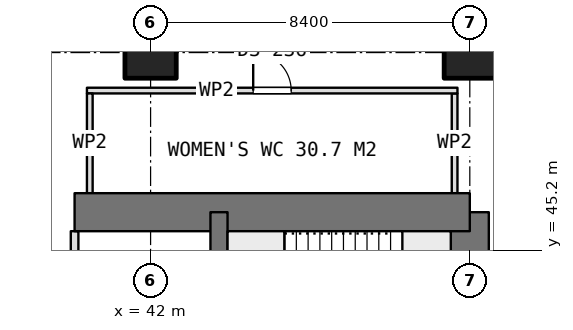
"""IFC4 building model, lengths in metres.
Left out: names, types, materials, properties, quantities, classifications, styles, units other than length and angle.
Written with IfcOpenShell. Run it as: python <this file> out.ifc"""

import sys

from ifc_helpers import new_model, si_unit, direction, frame, frame_2d, origin, origin_2d, place, context, subcontext, project, spatial, rectangle, extrude, element, fill, save


model = new_model("IFC4")
c1 = context("Model", 3, precision=1e-05, world=origin(), true_north=direction((0.0, 1.0)))
c2 = subcontext(c1, "Body", "Model", "MODEL_VIEW")
j1 = project(units=[si_unit("LENGTHUNIT", "METRE"), si_unit("PLANEANGLEUNIT", "RADIAN")], contexts=[c1])
p1 = place(None, origin())
s1 = spatial("IfcSite", under=j1, at=p1, CompositionType="ELEMENT")
p2 = place(p1, origin())
s2 = spatial("IfcBuilding", under=s1, at=p2, CompositionType="ELEMENT")
p3 = place(p2, frame((0.0, 0.0, 217.7)))
s3 = spatial("IfcBuildingStorey", under=s2, at=p3, CompositionType="ELEMENT", Elevation=217.7)
p4 = place(p3, frame((40.0, 46.2, 0.0), z_axis=(0.0, 0.0, 1.0), x_axis=(1.0, 0.0, 0.0)))
e1 = element("IfcWall", 1, at=p4, inside=s3, PredefinedType="SHEAR", context=c2, shape_type="SweptSolid", body=[
    extrude(rectangle(XDim=10.4, YDim=1.0, at=frame_2d((5.2, 0.0))), origin(), (0.0, 0.0, 1.0), 3.75),
])
p5 = place(p3, frame((50.4, 21.0, 0.0), z_axis=(0.0, 0.0, 1.0), x_axis=(0.0, 1.0, 0.0)))
e2 = element("IfcWall", 2, at=p5, inside=s3, PredefinedType="SHEAR", context=c2, shape_type="SweptSolid", body=[
    extrude(rectangle(XDim=25.2, YDim=1.0, at=frame_2d((12.6, 0.0))), origin(), (0.0, 0.0, 1.0), 3.75),
])
p6 = place(p5, frame((16.2, 0.0, 0.0)))
e3 = element("IfcOpeningElement", 3, at=p6, cuts=e2, PredefinedType="OPENING", context=c2, shape_type="SweptSolid", body=[
    extrude(rectangle(XDim=1.2, YDim=2.1, at=frame_2d((0.6, 1.05))), frame((0.0, 0.51, 0.0), z_axis=(0.0, -1.0, 0.0), x_axis=(1.0, 0.0, 0.0)), (0.0, 0.0, 1.0), 1.02),
])
p7 = place(p5, frame((10.05, 0.0, 0.0)))
e4 = element("IfcOpeningElement", 4, at=p7, cuts=e2, PredefinedType="OPENING", context=c2, shape_type="SweptSolid", body=[
    extrude(rectangle(XDim=0.9, YDim=2.1, at=frame_2d((0.45, 1.05))), frame((0.0, 0.51, 0.0), z_axis=(0.0, -1.0, 0.0), x_axis=(1.0, 0.0, 0.0)), (0.0, 0.0, 1.0), 1.02),
])
p8 = place(p5, frame((7.45, 0.0, 0.0)))
e5 = element("IfcOpeningElement", 5, at=p8, cuts=e2, PredefinedType="OPENING", context=c2, shape_type="SweptSolid", body=[
    extrude(rectangle(XDim=0.9, YDim=2.1, at=frame_2d((0.45, 1.05))), frame((0.0, 0.51, 0.0), z_axis=(0.0, -1.0, 0.0), x_axis=(1.0, 0.0, 0.0)), (0.0, 0.0, 1.0), 1.02),
])
p9 = place(p5, frame((0.7, 0.0, 0.0)))
e6 = element("IfcOpeningElement", 6, at=p9, cuts=e2, PredefinedType="OPENING", context=c2, shape_type="SweptSolid", body=[
    extrude(rectangle(XDim=1.2, YDim=2.1, at=frame_2d((0.6, 1.05))), frame((0.0, 0.51, 0.0), z_axis=(0.0, -1.0, 0.0), x_axis=(1.0, 0.0, 0.0)), (0.0, 0.0, 1.0), 1.02),
])
p10 = place(p3, frame((43.8, 21.0, 0.0), z_axis=(0.0, 0.0, 1.0), x_axis=(0.0, 1.0, 0.0)))
e7 = element("IfcWall", 7, at=p10, inside=s3, PredefinedType="SHEAR", context=c2, shape_type="SweptSolid", body=[
    extrude(rectangle(XDim=25.2, YDim=0.45, at=frame_2d((12.6, 0.0))), origin(), (0.0, 0.0, 1.0), 3.75),
])
for number, where, z_axis, x_axis in (
    (8, (42.0, 50.4, 0.0), (0.0, 0.0, 1.0), (1.0, 0.0, 0.0)),
    (9, (50.4, 50.4, 0.0), (0.0, 0.0, 1.0), (1.0, 0.0, 0.0)),
):
    element("IfcColumn", number, at=place(p3, frame(where, z_axis=z_axis, x_axis=x_axis)), inside=s3, PredefinedType="COLUMN", context=c2, shape_type="SweptSolid", body=[
        extrude(rectangle(XDim=1.35, YDim=1.35, at=origin_2d()), origin(), (0.0, 0.0, 1.0), 3.75),
    ])
p11 = place(p3, frame((40.0, 41.625, 0.0), z_axis=(0.0, 0.0, 1.0), x_axis=(0.0, 1.0, 0.0)))
e10 = element("IfcWall", 10, at=p11, inside=s3, PredefinedType="PARTITIONING", context=c2, shape_type="SweptSolid", body=[
    extrude(rectangle(XDim=4.075, YDim=0.2, at=frame_2d((2.038, 0.0))), origin(), (0.0, 0.0, 1.0), 3.5),
])
p12 = place(p11, frame((1.725, 0.0, 0.0)))
e11 = element("IfcOpeningElement", 11, at=p12, cuts=e10, PredefinedType="OPENING", context=c2, shape_type="SweptSolid", body=[
    extrude(rectangle(XDim=0.9, YDim=2.1, at=frame_2d((0.45, 1.05))), frame((0.0, 0.11, 0.0), z_axis=(0.0, -1.0, 0.0), x_axis=(1.0, 0.0, 0.0)), (0.0, 0.0, 1.0), 0.22),
])
p13 = place(p3, frame((40.325, 49.4, 0.0), z_axis=(0.0, 0.0, 1.0), x_axis=(1.0, 0.0, 0.0)))
e12 = element("IfcWall", 12, at=p13, inside=s3, PredefinedType="PARTITIONING", context=c2, shape_type="SweptSolid", body=[
    extrude(rectangle(XDim=9.75, YDim=0.15, at=frame_2d((4.875, 0.0))), origin(), (0.0, 0.0, 1.0), 3.5),
])
p14 = place(p13, frame((4.375, 0.0, 0.0)))
e13 = element("IfcOpeningElement", 13, at=p14, cuts=e12, PredefinedType="OPENING", context=c2, shape_type="SweptSolid", body=[
    extrude(rectangle(XDim=1.0, YDim=2.1, at=frame_2d((0.5, 1.05))), frame((0.0, 0.085, 0.0), z_axis=(0.0, -1.0, 0.0), x_axis=(1.0, 0.0, 0.0)), (0.0, 0.0, 1.0), 0.17),
])
for number, where, z_axis, x_axis in (
    (14, (40.4, 46.7, 0.0), (0.0, 0.0, 1.0), (0.0, 1.0, 0.0)),
    (15, (50.0, 46.7, 0.0), (0.0, 0.0, 1.0), (0.0, 1.0, 0.0)),
):
    element("IfcWall", number, at=place(p3, frame(where, z_axis=z_axis, x_axis=x_axis)), inside=s3, PredefinedType="PARTITIONING", context=c2, shape_type="SweptSolid", body=[
        extrude(rectangle(XDim=2.625, YDim=0.15, at=frame_2d((1.312, 0.0))), origin(), (0.0, 0.0, 1.0), 3.5),
    ])
p15 = place(p14, origin())
e16 = element("IfcDoor", 16, at=p15, inside=s3, OperationType="SINGLE_SWING_LEFT", PredefinedType="DOOR", context=c2, shape_type="SweptSolid", body=[
    extrude(rectangle(XDim=1.0, YDim=2.1, at=frame_2d((0.5, 1.05))), frame((0.0, 0.025, 0.0), z_axis=(0.0, -1.0, 0.0), x_axis=(1.0, 0.0, 0.0)), (0.0, 0.0, 1.0), 0.05),
])
fill(e13, e16)
save(model, sys.argv[1])
